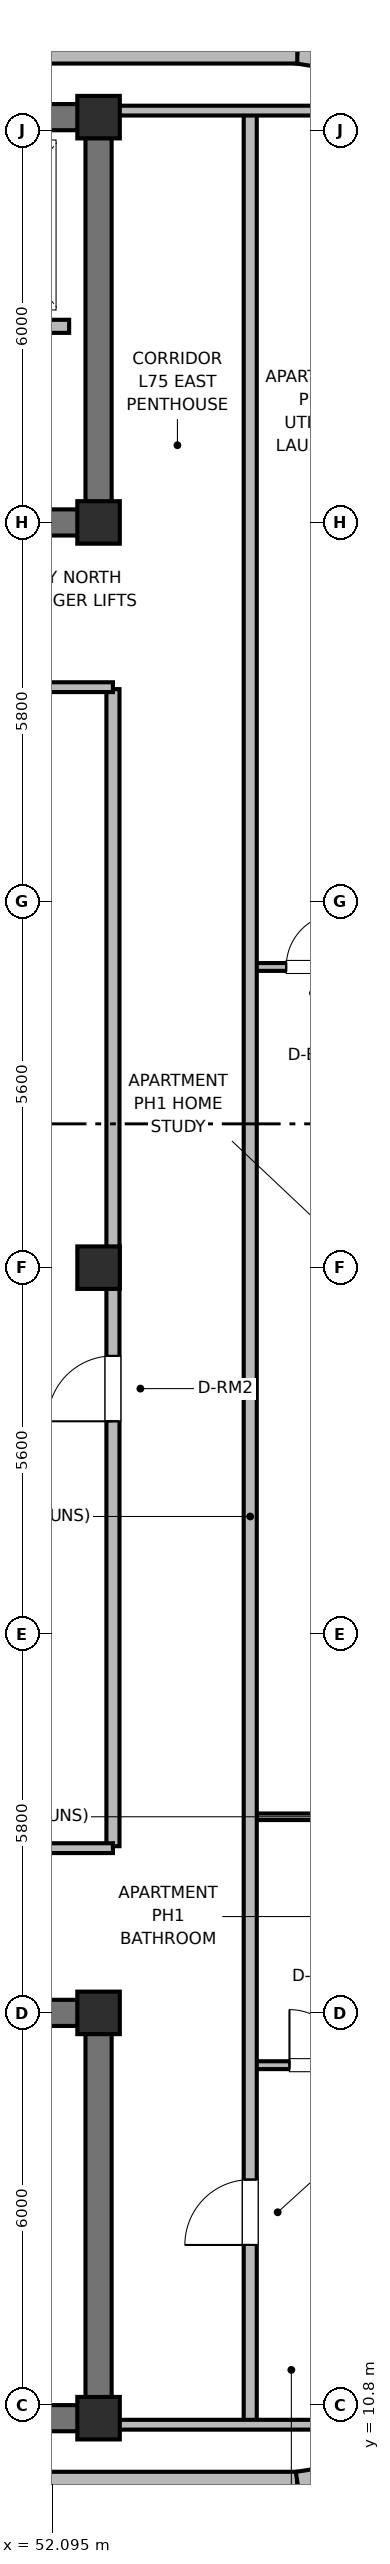
"""IFC4 building model, lengths in metres.
Left out: names, types, materials, properties, quantities, classifications, styles, units other than length and angle.
Written with IfcOpenShell. Run it as: python <this file> out.ifc"""

import sys

from ifc_helpers import new_model, si_unit, direction, frame, frame_2d, origin, origin_2d, place, context, subcontext, project, spatial, rectangle, extrude, element, fill, save


model = new_model("IFC4")
c1 = context("Model", 3, precision=1e-05, world=origin(), true_north=direction((0.0, 1.0)))
c2 = subcontext(c1, "Body", "Model", "MODEL_VIEW")
j1 = project(units=[si_unit("LENGTHUNIT", "METRE"), si_unit("PLANEANGLEUNIT", "RADIAN")], contexts=[c1])
p1 = place(None, origin())
s1 = spatial("IfcSite", under=j1, at=p1, CompositionType="ELEMENT")
p2 = place(p1, origin())
s2 = spatial("IfcBuilding", under=s1, at=p2, CompositionType="ELEMENT")
p3 = place(p2, frame((0.0, 0.0, 297.2)))
s3 = spatial("IfcBuildingStorey", under=s2, at=p3, CompositionType="ELEMENT", Elevation=297.2)
p4 = place(p3, frame((52.8, 10.6, 0.0), z_axis=(0.0, 0.0, 1.0), x_axis=(-1.0, 0.0, 0.0)))
e1 = element("IfcWall", 1, at=p4, inside=s3, PredefinedType="SHEAR", context=c2, shape_type="SweptSolid", body=[
    extrude(rectangle(XDim=27.2, YDim=0.4, at=frame_2d((13.6, 0.0))), origin(), (0.0, 0.0, 1.0), 4.8),
])
p5 = place(p3, frame((52.8, 10.8, 0.0), z_axis=(0.0, 0.0, 1.0), x_axis=(0.0, 1.0, 0.0)))
e2 = element("IfcWall", 2, at=p5, inside=s3, PredefinedType="SHEAR", context=c2, shape_type="SweptSolid", body=[
    extrude(rectangle(XDim=5.8, YDim=0.4, at=frame_2d((2.9, 0.0))), origin(), (0.0, 0.0, 1.0), 4.8),
])
p6 = place(p3, frame((25.6, 16.8, 0.0), z_axis=(0.0, 0.0, 1.0), x_axis=(1.0, 0.0, 0.0)))
e3 = element("IfcWall", 3, at=p6, inside=s3, PredefinedType="SHEAR", context=c2, shape_type="SweptSolid", body=[
    extrude(rectangle(XDim=27.2, YDim=0.4, at=frame_2d((13.6, 0.0))), origin(), (0.0, 0.0, 1.0), 4.8),
])
p7 = place(p6, frame((1.8, 0.0, 0.0)))
e4 = element("IfcOpeningElement", 4, at=p7, cuts=e3, PredefinedType="OPENING", context=c2, shape_type="SweptSolid", body=[
    extrude(rectangle(XDim=1.1, YDim=2.15, at=frame_2d((0.55, 1.075))), frame((0.0, 0.21, 0.0), z_axis=(0.0, -1.0, 0.0), x_axis=(1.0, 0.0, 0.0)), (0.0, 0.0, 1.0), 0.42),
])
p8 = place(p6, frame((5.6, 0.0, 0.0)))
e5 = element("IfcOpeningElement", 5, at=p8, cuts=e3, PredefinedType="OPENING", context=c2, shape_type="SweptSolid", body=[
    extrude(rectangle(XDim=0.85, YDim=2.1, at=frame_2d((0.425, 1.05))), frame((0.0, 0.21, 0.0), z_axis=(0.0, -1.0, 0.0), x_axis=(1.0, 0.0, 0.0)), (0.0, 0.0, 1.0), 0.42),
])
p9 = place(p6, frame((13.0, 0.0, 0.0)))
e6 = element("IfcOpeningElement", 6, at=p9, cuts=e3, PredefinedType="OPENING", context=c2, shape_type="SweptSolid", body=[
    extrude(rectangle(XDim=1.2, YDim=2.15, at=frame_2d((0.6, 1.075))), frame((0.0, 0.21, 0.0), z_axis=(0.0, -1.0, 0.0), x_axis=(1.0, 0.0, 0.0)), (0.0, 0.0, 1.0), 0.42),
])
p10 = place(p6, frame((19.2, 0.0, 0.0)))
e7 = element("IfcOpeningElement", 7, at=p10, cuts=e3, PredefinedType="OPENING", context=c2, shape_type="SweptSolid", body=[
    extrude(rectangle(XDim=0.85, YDim=2.1, at=frame_2d((0.425, 1.05))), frame((0.0, 0.21, 0.0), z_axis=(0.0, -1.0, 0.0), x_axis=(1.0, 0.0, 0.0)), (0.0, 0.0, 1.0), 0.42),
])
p11 = place(p6, frame((23.8, 0.0, 0.0)))
e8 = element("IfcOpeningElement", 8, at=p11, cuts=e3, PredefinedType="OPENING", context=c2, shape_type="SweptSolid", body=[
    extrude(rectangle(XDim=0.9, YDim=2.1, at=frame_2d((0.45, 1.05))), frame((0.0, 0.21, 0.0), z_axis=(0.0, -1.0, 0.0), x_axis=(1.0, 0.0, 0.0)), (0.0, 0.0, 1.0), 0.42),
])
p12 = place(p3, frame((25.6, 45.8, 0.0), z_axis=(0.0, 0.0, 1.0), x_axis=(1.0, 0.0, 0.0)))
e9 = element("IfcWall", 9, at=p12, inside=s3, PredefinedType="SHEAR", context=c2, shape_type="SweptSolid", body=[
    extrude(rectangle(XDim=27.2, YDim=0.4, at=frame_2d((13.6, 0.0))), origin(), (0.0, 0.0, 1.0), 4.8),
])
p13 = place(p3, frame((52.8, 39.8, 0.0), z_axis=(0.0, 0.0, 1.0), x_axis=(0.0, 1.0, 0.0)))
e10 = element("IfcWall", 10, at=p13, inside=s3, PredefinedType="SHEAR", context=c2, shape_type="SweptSolid", body=[
    extrude(rectangle(XDim=5.8, YDim=0.4, at=frame_2d((2.9, 0.0))), origin(), (0.0, 0.0, 1.0), 4.8),
])
p14 = place(p3, frame((52.8, 39.6, 0.0), z_axis=(0.0, 0.0, 1.0), x_axis=(-1.0, 0.0, 0.0)))
e11 = element("IfcWall", 11, at=p14, inside=s3, PredefinedType="SHEAR", context=c2, shape_type="SweptSolid", body=[
    extrude(rectangle(XDim=27.2, YDim=0.4, at=frame_2d((13.6, 0.0))), origin(), (0.0, 0.0, 1.0), 4.8),
])
p15 = place(p14, frame((24.2, 0.0, 0.0)))
e12 = element("IfcOpeningElement", 12, at=p15, cuts=e11, PredefinedType="OPENING", context=c2, shape_type="SweptSolid", body=[
    extrude(rectangle(XDim=1.1, YDim=2.15, at=frame_2d((0.55, 1.075))), frame((0.0, 0.21, 0.0), z_axis=(0.0, -1.0, 0.0), x_axis=(1.0, 0.0, 0.0)), (0.0, 0.0, 1.0), 0.42),
])
p16 = place(p14, frame((20.55, 0.0, 0.0)))
e13 = element("IfcOpeningElement", 13, at=p16, cuts=e11, PredefinedType="OPENING", context=c2, shape_type="SweptSolid", body=[
    extrude(rectangle(XDim=0.95, YDim=2.1, at=frame_2d((0.475, 1.05))), frame((0.0, 0.21, 0.0), z_axis=(0.0, -1.0, 0.0), x_axis=(1.0, 0.0, 0.0)), (0.0, 0.0, 1.0), 0.42),
])
p17 = place(p14, frame((15.1, 0.0, 0.0)))
e14 = element("IfcOpeningElement", 14, at=p17, cuts=e11, PredefinedType="OPENING", context=c2, shape_type="SweptSolid", body=[
    extrude(rectangle(XDim=1.2, YDim=2.15, at=frame_2d((0.6, 1.075))), frame((0.0, 0.21, 0.0), z_axis=(0.0, -1.0, 0.0), x_axis=(1.0, 0.0, 0.0)), (0.0, 0.0, 1.0), 0.42),
])
p18 = place(p14, frame((13.05, 0.0, 0.0)))
e15 = element("IfcOpeningElement", 15, at=p18, cuts=e11, PredefinedType="OPENING", context=c2, shape_type="SweptSolid", body=[
    extrude(rectangle(XDim=0.85, YDim=2.1, at=frame_2d((0.425, 1.05))), frame((0.0, 0.21, 0.0), z_axis=(0.0, -1.0, 0.0), x_axis=(1.0, 0.0, 0.0)), (0.0, 0.0, 1.0), 0.42),
])
p19 = place(p14, frame((11.0, 0.0, 0.0)))
e16 = element("IfcOpeningElement", 16, at=p19, cuts=e11, PredefinedType="OPENING", context=c2, shape_type="SweptSolid", body=[
    extrude(rectangle(XDim=0.85, YDim=2.1, at=frame_2d((0.425, 1.05))), frame((0.0, 0.21, 0.0), z_axis=(0.0, -1.0, 0.0), x_axis=(1.0, 0.0, 0.0)), (0.0, 0.0, 1.0), 0.42),
])
p20 = place(p14, frame((7.35, 0.0, 0.0)))
e17 = element("IfcOpeningElement", 17, at=p20, cuts=e11, PredefinedType="OPENING", context=c2, shape_type="SweptSolid", body=[
    extrude(rectangle(XDim=0.85, YDim=2.1, at=frame_2d((0.425, 1.05))), frame((0.0, 0.21, 0.0), z_axis=(0.0, -1.0, 0.0), x_axis=(1.0, 0.0, 0.0)), (0.0, 0.0, 1.0), 0.42),
])
p21 = place(p14, frame((4.2, 0.0, 0.0)))
e18 = element("IfcOpeningElement", 18, at=p21, cuts=e11, PredefinedType="OPENING", context=c2, shape_type="SweptSolid", body=[
    extrude(rectangle(XDim=1.3, YDim=2.2, at=frame_2d((0.65, 1.1))), frame((0.0, 0.21, 0.0), z_axis=(0.0, -1.0, 0.0), x_axis=(1.0, 0.0, 0.0)), (0.0, 0.0, 1.0), 0.42),
])
for number, where, z_axis, x_axis in (
    (19, (52.8, 10.6, 0.0), (0.0, 0.0, 1.0), (1.0, 0.0, 0.0)),
    (20, (52.8, 16.8, 0.0), (0.0, 0.0, 1.0), (1.0, 0.0, 0.0)),
    (21, (52.8, 39.6, 0.0), (0.0, 0.0, 1.0), (1.0, 0.0, 0.0)),
    (22, (52.8, 45.8, 0.0), (0.0, 0.0, 1.0), (1.0, 0.0, 0.0)),
    (23, (52.8, 28.2, 0.0), (0.0, 0.0, 1.0), (1.0, 0.0, 0.0)),
):
    element("IfcColumn", number, at=place(p3, frame(where, z_axis=z_axis, x_axis=x_axis)), inside=s3, PredefinedType="COLUMN", context=c2, shape_type="SweptSolid", body=[
        extrude(rectangle(XDim=0.65, YDim=0.65, at=origin_2d()), origin(), (0.0, 0.0, 1.0), 4.8),
    ])
p22 = place(p3, frame((30.21, 9.63, 0.0), z_axis=(0.0, 0.0, 1.0), x_axis=(1.0, 0.0, 0.0)))
e24 = element("IfcWall", 24, at=p22, inside=s3, PredefinedType="SOLIDWALL", context=c2, shape_type="SweptSolid", body=[
    extrude(rectangle(XDim=25.63, YDim=0.3, at=frame_2d((12.815, 0.0))), origin(), (0.0, 0.0, 1.0), 2.6),
])
p23 = place(p22, frame((1.228, 0.0, 0.38)))
e25 = element("IfcOpeningElement", 25, at=p23, cuts=e24, PredefinedType="OPENING", context=c2, shape_type="SweptSolid", body=[
    extrude(rectangle(XDim=2.2, YDim=2.1, at=frame_2d((1.1, 1.05))), frame((0.0, 0.16, 0.0), z_axis=(0.0, -1.0, 0.0), x_axis=(1.0, 0.0, 0.0)), (0.0, 0.0, 1.0), 0.32),
])
p24 = place(p22, frame((6.333, 0.0, 0.38)))
e26 = element("IfcOpeningElement", 26, at=p24, cuts=e24, PredefinedType="OPENING", context=c2, shape_type="SweptSolid", body=[
    extrude(rectangle(XDim=2.2, YDim=2.1, at=frame_2d((1.1, 1.05))), frame((0.0, 0.16, 0.0), z_axis=(0.0, -1.0, 0.0), x_axis=(1.0, 0.0, 0.0)), (0.0, 0.0, 1.0), 0.32),
])
p25 = place(p22, frame((9.337, 0.0, 0.38)))
e27 = element("IfcOpeningElement", 27, at=p25, cuts=e24, PredefinedType="OPENING", context=c2, shape_type="SweptSolid", body=[
    extrude(rectangle(XDim=2.2, YDim=2.1, at=frame_2d((1.1, 1.05))), frame((0.0, 0.16, 0.0), z_axis=(0.0, -1.0, 0.0), x_axis=(1.0, 0.0, 0.0)), (0.0, 0.0, 1.0), 0.32),
])
p26 = place(p22, frame((14.442, 0.0, 0.38)))
e28 = element("IfcOpeningElement", 28, at=p26, cuts=e24, PredefinedType="OPENING", context=c2, shape_type="SweptSolid", body=[
    extrude(rectangle(XDim=2.2, YDim=2.1, at=frame_2d((1.1, 1.05))), frame((0.0, 0.16, 0.0), z_axis=(0.0, -1.0, 0.0), x_axis=(1.0, 0.0, 0.0)), (0.0, 0.0, 1.0), 0.32),
])
p27 = place(p22, frame((17.798, 0.0, 0.38)))
e29 = element("IfcOpeningElement", 29, at=p27, cuts=e24, PredefinedType="OPENING", context=c2, shape_type="SweptSolid", body=[
    extrude(rectangle(XDim=2.2, YDim=2.1, at=frame_2d((1.1, 1.05))), frame((0.0, 0.16, 0.0), z_axis=(0.0, -1.0, 0.0), x_axis=(1.0, 0.0, 0.0)), (0.0, 0.0, 1.0), 0.32),
])
for number, where, z_axis, x_axis in (
    (30, (55.84, 9.63, 0.0), (0.0, 0.0, 1.0), (0.988, 0.157, 0.0)),
    (31, (56.782, 46.621, 0.0), (0.0, 0.0, 1.0), (-0.988, 0.157, 0.0)),
):
    element("IfcWall", number, at=place(p3, frame(where, z_axis=z_axis, x_axis=x_axis)), inside=s3, PredefinedType="SOLIDWALL", context=c2, shape_type="SweptSolid", body=[
        extrude(rectangle(XDim=0.954, YDim=0.3, at=frame_2d((0.477, 0.0))), origin(), (0.0, 0.0, 1.0), 2.6),
    ])
p28 = place(p3, frame((55.84, 46.77, 0.0), z_axis=(0.0, 0.0, 1.0), x_axis=(-1.0, 0.0, 0.0)))
e32 = element("IfcWall", 32, at=p28, inside=s3, PredefinedType="SOLIDWALL", context=c2, shape_type="SweptSolid", body=[
    extrude(rectangle(XDim=4.45, YDim=0.3, at=frame_2d((2.225, 0.0))), origin(), (0.0, 0.0, 1.0), 2.6),
])
p29 = place(p3, frame((52.35, 42.6, 0.0), z_axis=(0.0, 0.0, 1.0), x_axis=(-1.0, 0.0, 0.0)))
e33 = element("IfcWall", 33, at=p29, inside=s3, PredefinedType="PARTITIONING", context=c2, shape_type="SweptSolid", body=[
    extrude(rectangle(XDim=6.5, YDim=0.2, at=frame_2d((3.25, 0.0))), origin(), (0.0, 0.0, 1.0), 2.56),
])
p30 = place(p29, frame((4.9, 0.0, 0.0)))
e34 = element("IfcOpeningElement", 34, at=p30, cuts=e33, PredefinedType="OPENING", context=c2, shape_type="SweptSolid", body=[
    extrude(rectangle(XDim=1.0, YDim=2.15, at=frame_2d((0.5, 1.075))), frame((0.0, 0.11, 0.0), z_axis=(0.0, -1.0, 0.0), x_axis=(1.0, 0.0, 0.0)), (0.0, 0.0, 1.0), 0.22),
])
p31 = place(p29, frame((2.8, 0.0, 0.0)))
e35 = element("IfcOpeningElement", 35, at=p31, cuts=e33, PredefinedType="OPENING", context=c2, shape_type="SweptSolid", body=[
    extrude(rectangle(XDim=1.0, YDim=2.15, at=frame_2d((0.5, 1.075))), frame((0.0, 0.11, 0.0), z_axis=(0.0, -1.0, 0.0), x_axis=(1.0, 0.0, 0.0)), (0.0, 0.0, 1.0), 0.22),
])
p32 = place(p29, frame((0.7, 0.0, 0.0)))
e36 = element("IfcOpeningElement", 36, at=p32, cuts=e33, PredefinedType="OPENING", context=c2, shape_type="SweptSolid", body=[
    extrude(rectangle(XDim=1.0, YDim=2.15, at=frame_2d((0.5, 1.075))), frame((0.0, 0.11, 0.0), z_axis=(0.0, -1.0, 0.0), x_axis=(1.0, 0.0, 0.0)), (0.0, 0.0, 1.0), 0.22),
])
p33 = place(p3, frame((53.02, 19.35, 0.0), z_axis=(0.0, 0.0, 1.0), x_axis=(0.0, 1.0, 0.0)))
e37 = element("IfcWall", 37, at=p33, inside=s3, PredefinedType="PARTITIONING", context=c2, shape_type="SweptSolid", body=[
    extrude(rectangle(XDim=17.7, YDim=0.2, at=frame_2d((8.85, 0.0))), origin(), (0.0, 0.0, 1.0), 2.56),
])
p34 = place(p33, frame((6.5, 0.0, 0.0)))
e38 = element("IfcOpeningElement", 38, at=p34, cuts=e37, PredefinedType="OPENING", context=c2, shape_type="SweptSolid", body=[
    extrude(rectangle(XDim=1.0, YDim=2.15, at=frame_2d((0.5, 1.075))), frame((0.0, 0.11, 0.0), z_axis=(0.0, -1.0, 0.0), x_axis=(1.0, 0.0, 0.0)), (0.0, 0.0, 1.0), 0.22),
])
for number, where, z_axis, x_axis in (
    (39, (34.35, 19.32, 0.0), (0.0, 0.0, 1.0), (1.0, 0.0, 0.0)),
    (40, (34.35, 37.08, 0.0), (0.0, 0.0, 1.0), (1.0, 0.0, 0.0)),
):
    element("IfcWall", number, at=place(p3, frame(where, z_axis=z_axis, x_axis=x_axis)), inside=s3, PredefinedType="PARTITIONING", context=c2, shape_type="SweptSolid", body=[
        extrude(rectangle(XDim=18.67, YDim=0.15, at=frame_2d((9.335, 0.0))), origin(), (0.0, 0.0, 1.0), 2.56),
    ])
p35 = place(p3, frame((55.12, 16.0, 0.0), z_axis=(0.0, 0.0, 1.0), x_axis=(1.0, 0.0, 0.0)))
e41 = element("IfcWall", 41, at=p35, inside=s3, PredefinedType="PARTITIONING", context=c2, shape_type="SweptSolid", body=[
    extrude(rectangle(XDim=1.95, YDim=0.12, at=frame_2d((0.975, 0.0))), origin(), (0.0, 0.0, 1.0), 2.56),
])
p36 = place(p35, frame((0.6, 0.0, 0.0)))
e42 = element("IfcOpeningElement", 42, at=p36, cuts=e41, PredefinedType="OPENING", context=c2, shape_type="SweptSolid", body=[
    extrude(rectangle(XDim=0.85, YDim=2.1, at=frame_2d((0.425, 1.05))), frame((0.0, 0.07, 0.0), z_axis=(0.0, -1.0, 0.0), x_axis=(1.0, 0.0, 0.0)), (0.0, 0.0, 1.0), 0.14),
])
p37 = place(p3, frame((55.12, 19.8, 0.0), z_axis=(0.0, 0.0, 1.0), x_axis=(1.0, 0.0, 0.0)))
e43 = element("IfcWall", 43, at=p37, inside=s3, PredefinedType="PARTITIONING", context=c2, shape_type="SweptSolid", body=[
    extrude(rectangle(XDim=1.95, YDim=0.1, at=frame_2d((0.975, 0.0))), origin(), (0.0, 0.0, 1.0), 2.56),
])
p38 = place(p3, frame((55.12, 32.8, 0.0), z_axis=(0.0, 0.0, 1.0), x_axis=(1.0, 0.0, 0.0)))
e44 = element("IfcWall", 44, at=p38, inside=s3, PredefinedType="PARTITIONING", context=c2, shape_type="SweptSolid", body=[
    extrude(rectangle(XDim=1.95, YDim=0.12, at=frame_2d((0.975, 0.0))), origin(), (0.0, 0.0, 1.0), 2.56),
])
p39 = place(p38, frame((0.55, 0.0, 0.0)))
e45 = element("IfcOpeningElement", 45, at=p39, cuts=e44, PredefinedType="OPENING", context=c2, shape_type="SweptSolid", body=[
    extrude(rectangle(XDim=0.82, YDim=2.08, at=frame_2d((0.41, 1.04))), frame((0.0, 0.07, 0.0), z_axis=(0.0, -1.0, 0.0), x_axis=(1.0, 0.0, 0.0)), (0.0, 0.0, 1.0), 0.14),
])
p40 = place(p3, frame((55.12, 10.5, 0.0), z_axis=(0.0, 0.0, 1.0), x_axis=(0.0, 1.0, 0.0)))
e46 = element("IfcWall", 46, at=p40, inside=s3, PredefinedType="PARTITIONING", context=c2, shape_type="SweptSolid", body=[
    extrude(rectangle(XDim=35.4, YDim=0.2, at=frame_2d((17.7, 0.0))), origin(), (0.0, 0.0, 1.0), 2.56),
])
p41 = place(p40, frame((2.75, 0.0, 0.0)))
e47 = element("IfcOpeningElement", 47, at=p41, cuts=e46, PredefinedType="OPENING", context=c2, shape_type="SweptSolid", body=[
    extrude(rectangle(XDim=1.0, YDim=2.15, at=frame_2d((0.5, 1.075))), frame((0.0, 0.11, 0.0), z_axis=(0.0, -1.0, 0.0), x_axis=(1.0, 0.0, 0.0)), (0.0, 0.0, 1.0), 0.22),
])
for number, where, z_axis, x_axis in (
    (48, (53.1, 10.5, 0.0), (0.0, 0.0, 1.0), (1.0, 0.0, 0.0)),
    (49, (53.1, 45.9, 0.0), (0.0, 0.0, 1.0), (1.0, 0.0, 0.0)),
):
    element("IfcWall", number, at=place(p3, frame(where, z_axis=z_axis, x_axis=x_axis)), inside=s3, PredefinedType="PARTITIONING", context=c2, shape_type="SweptSolid", body=[
        extrude(rectangle(XDim=4.86, YDim=0.15, at=frame_2d((2.43, 0.0))), origin(), (0.0, 0.0, 1.0), 2.56),
    ])
p42 = place(p34, origin())
e50 = element("IfcDoor", 50, at=p42, inside=s3, OperationType="SINGLE_SWING_LEFT", PredefinedType="DOOR", context=c2, shape_type="SweptSolid", body=[
    extrude(rectangle(XDim=1.0, YDim=2.15, at=frame_2d((0.5, 1.075))), frame((0.0, 0.025, 0.0), z_axis=(0.0, -1.0, 0.0), x_axis=(1.0, 0.0, 0.0)), (0.0, 0.0, 1.0), 0.05),
])
fill(e38, e50)
p43 = place(p36, origin())
e51 = element("IfcDoor", 51, at=p43, inside=s3, OperationType="SINGLE_SWING_LEFT", PredefinedType="DOOR", context=c2, shape_type="SweptSolid", body=[
    extrude(rectangle(XDim=0.85, YDim=2.1, at=frame_2d((0.425, 1.05))), frame((0.0, 0.025, 0.0), z_axis=(0.0, -1.0, 0.0), x_axis=(1.0, 0.0, 0.0)), (0.0, 0.0, 1.0), 0.05),
])
fill(e42, e51)
p44 = place(p39, origin())
e52 = element("IfcDoor", 52, at=p44, inside=s3, OperationType="SINGLE_SWING_RIGHT", PredefinedType="DOOR", context=c2, shape_type="SweptSolid", body=[
    extrude(rectangle(XDim=0.82, YDim=2.08, at=frame_2d((0.41, 1.04))), frame((0.0, 0.025, 0.0), z_axis=(0.0, -1.0, 0.0), x_axis=(1.0, 0.0, 0.0)), (0.0, 0.0, 1.0), 0.05),
])
fill(e45, e52)
p45 = place(p41, origin())
e53 = element("IfcDoor", 53, at=p45, inside=s3, OperationType="SINGLE_SWING_LEFT", PredefinedType="DOOR", context=c2, shape_type="SweptSolid", body=[
    extrude(rectangle(XDim=1.0, YDim=2.15, at=frame_2d((0.5, 1.075))), frame((0.0, 0.025, 0.0), z_axis=(0.0, -1.0, 0.0), x_axis=(1.0, 0.0, 0.0)), (0.0, 0.0, 1.0), 0.05),
])
fill(e47, e53)
save(model, sys.argv[1])
